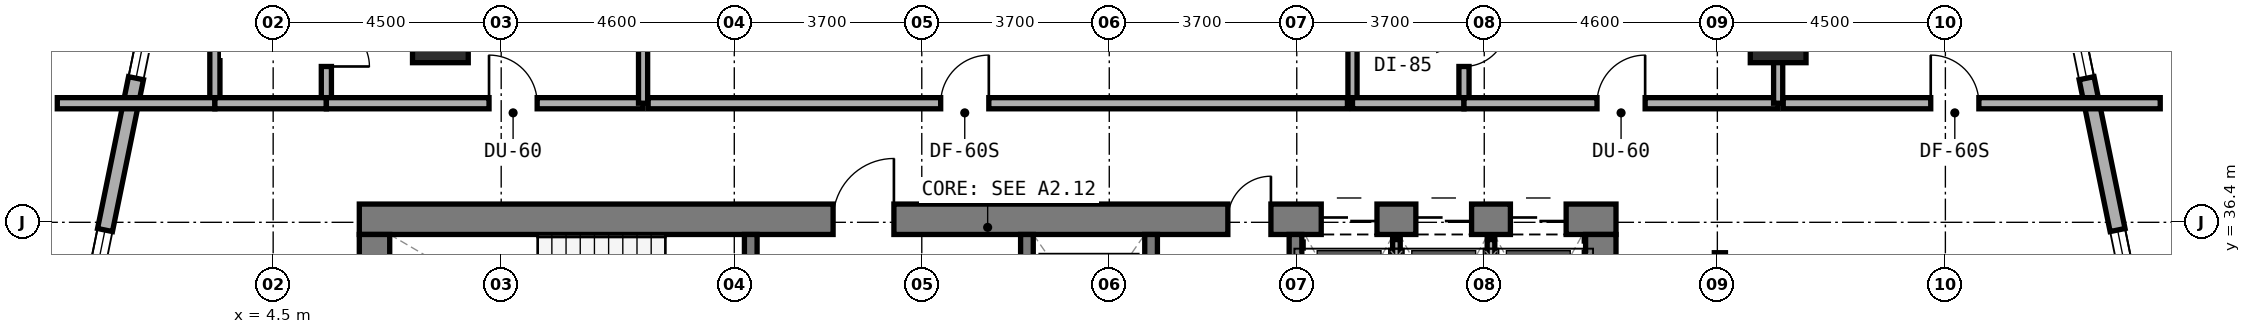
"""IFC4 building model, lengths in metres.
Left out: names, types, materials, properties, quantities, classifications, styles, units other than length and angle.
Written with IfcOpenShell. Run it as: python <this file> out.ifc"""

import sys

from ifc_helpers import new_model, si_unit, direction, frame, frame_2d, origin, origin_2d, place, context, subcontext, project, spatial, rectangle, extrude, element, fill, save


model = new_model("IFC4")
c1 = context("Model", 3, precision=1e-05, world=origin(), true_north=direction((0.0, 1.0)))
c2 = subcontext(c1, "Body", "Model", "MODEL_VIEW")
j1 = project(units=[si_unit("LENGTHUNIT", "METRE"), si_unit("PLANEANGLEUNIT", "RADIAN")], contexts=[c1])
p1 = place(None, origin())
s1 = spatial("IfcSite", under=j1, at=p1, CompositionType="ELEMENT")
p2 = place(p1, origin())
s2 = spatial("IfcBuilding", under=s1, at=p2, CompositionType="ELEMENT")
p3 = place(p2, frame((0.0, 0.0, 45.0)))
s3 = spatial("IfcBuildingStorey", under=s2, at=p3, CompositionType="ELEMENT", Elevation=45.0)
p4 = place(p3, frame((6.2, 36.46, 0.0), z_axis=(0.0, 0.0, 1.0), x_axis=(1.0, 0.0, 0.0)))
e1 = element("IfcWall", 1, at=p4, inside=s3, PredefinedType="SHEAR", context=c2, shape_type="SweptSolid", body=[
    extrude(rectangle(XDim=24.8, YDim=0.6, at=frame_2d((12.4, 0.0))), origin(), (0.0, 0.0, 1.0), 3.5),
])
p5 = place(p4, frame((9.35, 0.0, 0.0)))
e2 = element("IfcOpeningElement", 2, at=p5, cuts=e1, PredefinedType="OPENING", context=c2, shape_type="SweptSolid", body=[
    extrude(rectangle(XDim=1.2, YDim=2.15, at=frame_2d((0.6, 1.075))), frame((0.0, 0.31, 0.0), z_axis=(0.0, -1.0, 0.0), x_axis=(1.0, 0.0, 0.0)), (0.0, 0.0, 1.0), 0.62),
])
p6 = place(p4, frame((17.14, 0.0, 0.0)))
e3 = element("IfcOpeningElement", 3, at=p6, cuts=e1, PredefinedType="OPENING", context=c2, shape_type="SweptSolid", body=[
    extrude(rectangle(XDim=0.85, YDim=2.1, at=frame_2d((0.425, 1.05))), frame((0.0, 0.31, 0.0), z_axis=(0.0, -1.0, 0.0), x_axis=(1.0, 0.0, 0.0)), (0.0, 0.0, 1.0), 0.62),
])
p7 = place(p4, frame((18.983, 0.0, 0.0)))
e4 = element("IfcOpeningElement", 4, at=p7, cuts=e1, PredefinedType="OPENING", context=c2, shape_type="SweptSolid", body=[
    extrude(rectangle(XDim=1.1, YDim=2.15, at=frame_2d((0.55, 1.075))), frame((0.0, 0.31, 0.0), z_axis=(0.0, -1.0, 0.0), x_axis=(1.0, 0.0, 0.0)), (0.0, 0.0, 1.0), 0.62),
])
p8 = place(p4, frame((20.85, 0.0, 0.0)))
e5 = element("IfcOpeningElement", 5, at=p8, cuts=e1, PredefinedType="OPENING", context=c2, shape_type="SweptSolid", body=[
    extrude(rectangle(XDim=1.1, YDim=2.15, at=frame_2d((0.55, 1.075))), frame((0.0, 0.31, 0.0), z_axis=(0.0, -1.0, 0.0), x_axis=(1.0, 0.0, 0.0)), (0.0, 0.0, 1.0), 0.62),
])
p9 = place(p4, frame((22.716, 0.0, 0.0)))
e6 = element("IfcOpeningElement", 6, at=p9, cuts=e1, PredefinedType="OPENING", context=c2, shape_type="SweptSolid", body=[
    extrude(rectangle(XDim=1.1, YDim=2.15, at=frame_2d((0.55, 1.075))), frame((0.0, 0.31, 0.0), z_axis=(0.0, -1.0, 0.0), x_axis=(1.0, 0.0, 0.0)), (0.0, 0.0, 1.0), 0.62),
])
for number, where, z_axis, x_axis in (
    (7, (6.5, 33.0, 0.0), (0.0, 0.0, 1.0), (0.0, 1.0, 0.0)),
    (8, (30.7, 33.0, 0.0), (0.0, 0.0, 1.0), (0.0, 1.0, 0.0)),
):
    element("IfcWall", number, at=place(p3, frame(where, z_axis=z_axis, x_axis=x_axis)), inside=s3, PredefinedType="SHEAR", context=c2, shape_type="SweptSolid", body=[
        extrude(rectangle(XDim=3.16, YDim=0.6, at=frame_2d((1.58, 0.0))), origin(), (0.0, 0.0, 1.0), 3.5),
    ])
p10 = place(p3, frame((13.925, 33.0, 0.0), z_axis=(0.0, 0.0, 1.0), x_axis=(0.0, 1.0, 0.0)))
e9 = element("IfcWall", 9, at=p10, inside=s3, PredefinedType="STANDARD", context=c2, shape_type="SweptSolid", body=[
    extrude(rectangle(XDim=3.16, YDim=0.25, at=frame_2d((1.58, 0.0))), origin(), (0.0, 0.0, 1.0), 3.22),
])
p11 = place(p10, frame((0.98, 0.0, 0.0)))
e10 = element("IfcOpeningElement", 10, at=p11, cuts=e9, PredefinedType="OPENING", context=c2, shape_type="SweptSolid", body=[
    extrude(rectangle(XDim=1.1, YDim=2.15, at=frame_2d((0.55, 1.075))), frame((0.0, 0.135, 0.0), z_axis=(0.0, -1.0, 0.0), x_axis=(1.0, 0.0, 0.0)), (0.0, 0.0, 1.0), 0.27),
])
p12 = place(p3, frame((19.375, 33.0, 0.0), z_axis=(0.0, 0.0, 1.0), x_axis=(0.0, 1.0, 0.0)))
e11 = element("IfcWall", 11, at=p12, inside=s3, PredefinedType="STANDARD", context=c2, shape_type="SweptSolid", body=[
    extrude(rectangle(XDim=3.16, YDim=0.25, at=frame_2d((1.58, 0.0))), origin(), (0.0, 0.0, 1.0), 3.22),
])
p13 = place(p12, frame((0.98, 0.0, 0.0)))
e12 = element("IfcOpeningElement", 12, at=p13, cuts=e11, PredefinedType="OPENING", context=c2, shape_type="SweptSolid", body=[
    extrude(rectangle(XDim=1.1, YDim=2.15, at=frame_2d((0.55, 1.075))), frame((0.0, 0.135, 0.0), z_axis=(0.0, -1.0, 0.0), x_axis=(1.0, 0.0, 0.0)), (0.0, 0.0, 1.0), 0.27),
])
for number, where, z_axis, x_axis in (
    (13, (21.825, 33.0, 0.0), (0.0, 0.0, 1.0), (0.0, 1.0, 0.0)),
    (14, (24.675, 33.0, 0.0), (0.0, 0.0, 1.0), (0.0, 1.0, 0.0)),
):
    element("IfcWall", number, at=place(p3, frame(where, z_axis=z_axis, x_axis=x_axis)), inside=s3, PredefinedType="STANDARD", context=c2, shape_type="SweptSolid", body=[
        extrude(rectangle(XDim=3.16, YDim=0.25, at=frame_2d((1.58, 0.0))), origin(), (0.0, 0.0, 1.0), 3.22),
    ])
for number, where, z_axis, x_axis in (
    (15, (34.2, 40.2, 0.0), (0.0, 0.0, 1.0), (1.0, 0.0, 0.0)),
    (16, (7.8, 40.2, 0.0), (0.0, 0.0, 1.0), (1.0, 0.0, 0.0)),
):
    element("IfcColumn", number, at=place(p3, frame(where, z_axis=z_axis, x_axis=x_axis)), inside=s3, PredefinedType="COLUMN", context=c2, shape_type="SweptSolid", body=[
        extrude(rectangle(XDim=1.1, YDim=1.3, at=origin_2d()), origin(), (0.0, 0.0, 1.0), 3.5),
    ])
p14 = place(p3, frame((41.864, 31.516, 0.0), z_axis=(0.0, 0.0, 1.0), x_axis=(-0.199990901713, 0.979797754249, 0.0)))
e17 = element("IfcWall", 17, at=p14, inside=s3, PredefinedType="STANDARD", context=c2, shape_type="SweptSolid", body=[
    extrude(rectangle(XDim=10.065, YDim=0.3, at=frame_2d((5.033, 0.0))), origin(), (0.0, 0.0, 1.0), 3.22),
])
p15 = place(p14, frame((2.429, 0.0, 0.8)))
e18 = element("IfcOpeningElement", 18, at=p15, cuts=e17, PredefinedType="OPENING", context=c2, shape_type="SweptSolid", body=[
    extrude(rectangle(XDim=2.4, YDim=1.6, at=frame_2d((1.2, 0.8))), frame((0.0, 0.16, 0.0), z_axis=(0.0, -1.0, 0.0), x_axis=(1.0, 0.0, 0.0)), (0.0, 0.0, 1.0), 0.32),
])
p16 = place(p14, frame((7.887, 0.0, 0.85)))
e19 = element("IfcOpeningElement", 19, at=p16, cuts=e17, PredefinedType="OPENING", context=c2, shape_type="SweptSolid", body=[
    extrude(rectangle(XDim=1.8, YDim=1.5, at=frame_2d((0.9, 0.75))), frame((0.0, 0.16, 0.0), z_axis=(0.0, -1.0, 0.0), x_axis=(1.0, 0.0, 0.0)), (0.0, 0.0, 1.0), 0.32),
])
p17 = place(p3, frame((2.229, 41.378, 0.0), z_axis=(0.0, 0.0, 1.0), x_axis=(-0.199990901713, -0.979797754249, 0.0)))
e20 = element("IfcWall", 20, at=p17, inside=s3, PredefinedType="STANDARD", context=c2, shape_type="SweptSolid", body=[
    extrude(rectangle(XDim=10.065, YDim=0.3, at=frame_2d((5.033, 0.0))), origin(), (0.0, 0.0, 1.0), 3.22),
])
p18 = place(p17, frame((0.378, 0.0, 0.85)))
e21 = element("IfcOpeningElement", 21, at=p18, cuts=e20, PredefinedType="OPENING", context=c2, shape_type="SweptSolid", body=[
    extrude(rectangle(XDim=1.8, YDim=1.5, at=frame_2d((0.9, 0.75))), frame((0.0, 0.16, 0.0), z_axis=(0.0, -1.0, 0.0), x_axis=(1.0, 0.0, 0.0)), (0.0, 0.0, 1.0), 0.32),
])
p19 = place(p17, frame((5.236, 0.0, 0.8)))
e22 = element("IfcOpeningElement", 22, at=p19, cuts=e20, PredefinedType="OPENING", context=c2, shape_type="SweptSolid", body=[
    extrude(rectangle(XDim=2.4, YDim=1.6, at=frame_2d((1.2, 0.8))), frame((0.0, 0.16, 0.0), z_axis=(0.0, -1.0, 0.0), x_axis=(1.0, 0.0, 0.0)), (0.0, 0.0, 1.0), 0.32),
])
p20 = place(p3, frame((26.667, 33.1, 0.0), z_axis=(0.0, 0.0, 1.0), x_axis=(0.0, 1.0, 0.0)))
e23 = element("IfcWall", 23, at=p20, inside=s3, PredefinedType="PARTITIONING", context=c2, shape_type="SweptSolid", body=[
    extrude(rectangle(XDim=2.96, YDim=0.15, at=frame_2d((1.48, 0.0))), origin(), (0.0, 0.0, 1.0), 3.22),
])
p21 = place(p3, frame((28.533, 33.1, 0.0), z_axis=(0.0, 0.0, 1.0), x_axis=(0.0, 1.0, 0.0)))
e24 = element("IfcWall", 24, at=p21, inside=s3, PredefinedType="PARTITIONING", context=c2, shape_type="SweptSolid", body=[
    extrude(rectangle(XDim=2.96, YDim=0.15, at=frame_2d((1.48, 0.0))), origin(), (0.0, 0.0, 1.0), 2.395),
])
p22 = place(p3, frame((5.55, 38.85, 0.0), z_axis=(0.0, 0.0, 1.0), x_axis=(0.0, 1.0, 0.0)))
e25 = element("IfcWall", 25, at=p22, inside=s3, PredefinedType="PLUMBINGWALL", context=c2, shape_type="SweptSolid", body=[
    extrude(rectangle(XDim=2.1, YDim=0.2, at=frame_2d((1.05, 0.0))), origin(), (0.0, 0.0, 1.0), 3.22),
])
p23 = place(p22, frame((0.625, 0.0, 0.0)))
e26 = element("IfcOpeningElement", 26, at=p23, cuts=e25, PredefinedType="OPENING", context=c2, shape_type="SweptSolid", body=[
    extrude(rectangle(XDim=0.85, YDim=2.1, at=frame_2d((0.425, 1.05))), frame((0.0, 0.11, 0.0), z_axis=(0.0, -1.0, 0.0), x_axis=(1.0, 0.0, 0.0)), (0.0, 0.0, 1.0), 0.22),
])
p24 = place(p3, frame((3.35, 38.85, 0.0), z_axis=(0.0, 0.0, 1.0), x_axis=(0.0, 1.0, 0.0)))
e27 = element("IfcWall", 27, at=p24, inside=s3, PredefinedType="PLUMBINGWALL", context=c2, shape_type="SweptSolid", body=[
    extrude(rectangle(XDim=2.1, YDim=0.2, at=frame_2d((1.05, 0.0))), origin(), (0.0, 0.0, 1.0), 3.22),
])
p25 = place(p3, frame((0.24, 38.75, 0.0), z_axis=(0.0, 0.0, 1.0), x_axis=(1.0, 0.0, 0.0)))
e28 = element("IfcWall", 28, at=p25, inside=s3, PredefinedType="SOLIDWALL", context=c2, shape_type="SweptSolid", body=[
    extrude(rectangle(XDim=3.11, YDim=0.22, at=frame_2d((1.555, 0.0))), origin(), (0.0, 0.0, 1.0), 3.22),
])
p26 = place(p3, frame((3.35, 38.75, 0.0), z_axis=(0.0, 0.0, 1.0), x_axis=(1.0, 0.0, 0.0)))
e29 = element("IfcWall", 29, at=p26, inside=s3, PredefinedType="SOLIDWALL", context=c2, shape_type="SweptSolid", body=[
    extrude(rectangle(XDim=2.2, YDim=0.22, at=frame_2d((1.1, 0.0))), origin(), (0.0, 0.0, 1.0), 3.22),
])
p27 = place(p3, frame((5.55, 38.75, 0.0), z_axis=(0.0, 0.0, 1.0), x_axis=(1.0, 0.0, 0.0)))
e30 = element("IfcWall", 30, at=p27, inside=s3, PredefinedType="SOLIDWALL", context=c2, shape_type="SweptSolid", body=[
    extrude(rectangle(XDim=6.25, YDim=0.22, at=frame_2d((3.125, 0.0))), origin(), (0.0, 0.0, 1.0), 2.395),
])
p28 = place(p27, frame((3.21, 0.0, 0.0)))
e31 = element("IfcOpeningElement", 31, at=p28, cuts=e30, PredefinedType="OPENING", context=c2, shape_type="SweptSolid", body=[
    extrude(rectangle(XDim=0.95, YDim=2.1, at=frame_2d((0.475, 1.05))), frame((0.0, 0.12, 0.0), z_axis=(0.0, -1.0, 0.0), x_axis=(1.0, 0.0, 0.0)), (0.0, 0.0, 1.0), 0.24),
])
p29 = place(p3, frame((11.8, 38.75, 0.0), z_axis=(0.0, 0.0, 1.0), x_axis=(0.0, 1.0, 0.0)))
e32 = element("IfcWall", 32, at=p29, inside=s3, PredefinedType="SOLIDWALL", context=c2, shape_type="SweptSolid", body=[
    extrude(rectangle(XDim=7.538, YDim=0.18, at=frame_2d((3.769, 0.0))), origin(), (0.0, 0.0, 1.0), 2.745),
])
p30 = place(p3, frame((11.9, 38.75, 0.0), z_axis=(0.0, 0.0, 1.0), x_axis=(1.0, 0.0, 0.0)))
e33 = element("IfcWall", 33, at=p30, inside=s3, PredefinedType="SOLIDWALL", context=c2, shape_type="SweptSolid", body=[
    extrude(rectangle(XDim=13.8, YDim=0.22, at=frame_2d((6.9, 0.0))), origin(), (0.0, 0.0, 1.0), 2.395),
])
p31 = place(p30, frame((5.773, 0.0, 0.0)))
e34 = element("IfcOpeningElement", 34, at=p31, cuts=e33, PredefinedType="OPENING", context=c2, shape_type="SweptSolid", body=[
    extrude(rectangle(XDim=0.95, YDim=2.1, at=frame_2d((0.475, 1.05))), frame((0.0, 0.12, 0.0), z_axis=(0.0, -1.0, 0.0), x_axis=(1.0, 0.0, 0.0)), (0.0, 0.0, 1.0), 0.24),
])
p32 = place(p3, frame((25.8, 38.75, 0.0), z_axis=(0.0, 0.0, 1.0), x_axis=(0.0, 1.0, 0.0)))
e35 = element("IfcWall", 35, at=p32, inside=s3, PredefinedType="SOLIDWALL", context=c2, shape_type="SweptSolid", body=[
    extrude(rectangle(XDim=8.19, YDim=0.18, at=frame_2d((4.095, 0.0))), origin(), (0.0, 0.0, 1.0), 2.395),
])
p33 = place(p3, frame((28.0, 38.85, 0.0), z_axis=(0.0, 0.0, 1.0), x_axis=(0.0, 1.0, 0.0)))
e36 = element("IfcWall", 36, at=p33, inside=s3, PredefinedType="PLUMBINGWALL", context=c2, shape_type="SweptSolid", body=[
    extrude(rectangle(XDim=2.1, YDim=0.2, at=frame_2d((1.05, 0.0))), origin(), (0.0, 0.0, 1.0), 2.745),
])
p34 = place(p33, frame((0.625, 0.0, 0.0)))
e37 = element("IfcOpeningElement", 37, at=p34, cuts=e36, PredefinedType="OPENING", context=c2, shape_type="SweptSolid", body=[
    extrude(rectangle(XDim=0.85, YDim=2.1, at=frame_2d((0.425, 1.05))), frame((0.0, 0.11, 0.0), z_axis=(0.0, -1.0, 0.0), x_axis=(1.0, 0.0, 0.0)), (0.0, 0.0, 1.0), 0.22),
])
p35 = place(p3, frame((25.8, 38.75, 0.0), z_axis=(0.0, 0.0, 1.0), x_axis=(1.0, 0.0, 0.0)))
e38 = element("IfcWall", 38, at=p35, inside=s3, PredefinedType="SOLIDWALL", context=c2, shape_type="SweptSolid", body=[
    extrude(rectangle(XDim=2.2, YDim=0.22, at=frame_2d((1.1, 0.0))), origin(), (0.0, 0.0, 1.0), 2.395),
])
p36 = place(p3, frame((28.0, 38.75, 0.0), z_axis=(0.0, 0.0, 1.0), x_axis=(1.0, 0.0, 0.0)))
e39 = element("IfcWall", 39, at=p36, inside=s3, PredefinedType="SOLIDWALL", context=c2, shape_type="SweptSolid", body=[
    extrude(rectangle(XDim=6.2, YDim=0.22, at=frame_2d((3.1, 0.0))), origin(), (0.0, 0.0, 1.0), 2.395),
])
p37 = place(p36, frame((2.625, 0.0, 0.0)))
e40 = element("IfcOpeningElement", 40, at=p37, cuts=e39, PredefinedType="OPENING", context=c2, shape_type="SweptSolid", body=[
    extrude(rectangle(XDim=0.95, YDim=2.1, at=frame_2d((0.475, 1.05))), frame((0.0, 0.12, 0.0), z_axis=(0.0, -1.0, 0.0), x_axis=(1.0, 0.0, 0.0)), (0.0, 0.0, 1.0), 0.24),
])
p38 = place(p3, frame((34.2, 38.75, 0.0), z_axis=(0.0, 0.0, 1.0), x_axis=(0.0, 1.0, 0.0)))
e41 = element("IfcWall", 41, at=p38, inside=s3, PredefinedType="SOLIDWALL", context=c2, shape_type="SweptSolid", body=[
    extrude(rectangle(XDim=6.674, YDim=0.18, at=frame_2d((3.337, 0.0))), origin(), (0.0, 0.0, 1.0), 2.395),
])
p39 = place(p3, frame((34.3, 38.75, 0.0), z_axis=(0.0, 0.0, 1.0), x_axis=(1.0, 0.0, 0.0)))
e42 = element("IfcWall", 42, at=p39, inside=s3, PredefinedType="SOLIDWALL", context=c2, shape_type="SweptSolid", body=[
    extrude(rectangle(XDim=7.44, YDim=0.22, at=frame_2d((3.72, 0.0))), origin(), (0.0, 0.0, 1.0), 2.745),
])
p40 = place(p39, frame((2.911, 0.0, 0.0)))
e43 = element("IfcOpeningElement", 43, at=p40, cuts=e42, PredefinedType="OPENING", context=c2, shape_type="SweptSolid", body=[
    extrude(rectangle(XDim=0.95, YDim=2.1, at=frame_2d((0.475, 1.05))), frame((0.0, 0.12, 0.0), z_axis=(0.0, -1.0, 0.0), x_axis=(1.0, 0.0, 0.0)), (0.0, 0.0, 1.0), 0.24),
])
p41 = place(p3, frame((33.05, 26.43, 0.0), z_axis=(0.0, 0.0, 1.0), x_axis=(0.0, 1.0, 0.0)))
e44 = element("IfcWall", 44, at=p41, inside=s3, PredefinedType="SOLIDWALL", context=c2, shape_type="SweptSolid", body=[
    extrude(rectangle(XDim=9.37, YDim=0.22, at=frame_2d((4.685, 0.0))), origin(), (0.0, 0.0, 1.0), 2.395),
])
p42 = place(p41, frame((4.21, 0.0, 0.0)))
e45 = element("IfcOpeningElement", 45, at=p42, cuts=e44, PredefinedType="OPENING", context=c2, shape_type="SweptSolid", body=[
    extrude(rectangle(XDim=0.95, YDim=2.1, at=frame_2d((0.475, 1.05))), frame((0.0, 0.12, 0.0), z_axis=(0.0, -1.0, 0.0), x_axis=(1.0, 0.0, 0.0)), (0.0, 0.0, 1.0), 0.24),
])
p43 = place(p15, origin())
e46 = element("IfcWindow", 46, at=p43, inside=s3, PartitioningType="SINGLE_PANEL", PredefinedType="WINDOW", context=c2, shape_type="SweptSolid", body=[
    extrude(rectangle(XDim=2.4, YDim=1.6, at=frame_2d((1.2, 0.8))), frame((0.0, 0.03, 0.0), z_axis=(0.0, -1.0, 0.0), x_axis=(1.0, 0.0, 0.0)), (0.0, 0.0, 1.0), 0.06),
])
fill(e18, e46)
p44 = place(p16, origin())
e47 = element("IfcWindow", 47, at=p44, inside=s3, PartitioningType="SINGLE_PANEL", PredefinedType="WINDOW", context=c2, shape_type="SweptSolid", body=[
    extrude(rectangle(XDim=1.8, YDim=1.5, at=frame_2d((0.9, 0.75))), frame((0.0, 0.03, 0.0), z_axis=(0.0, -1.0, 0.0), x_axis=(1.0, 0.0, 0.0)), (0.0, 0.0, 1.0), 0.06),
])
fill(e19, e47)
p45 = place(p18, origin())
e48 = element("IfcWindow", 48, at=p45, inside=s3, PartitioningType="SINGLE_PANEL", PredefinedType="WINDOW", context=c2, shape_type="SweptSolid", body=[
    extrude(rectangle(XDim=1.8, YDim=1.5, at=frame_2d((0.9, 0.75))), frame((0.0, 0.03, 0.0), z_axis=(0.0, -1.0, 0.0), x_axis=(1.0, 0.0, 0.0)), (0.0, 0.0, 1.0), 0.06),
])
fill(e21, e48)
p46 = place(p19, origin())
e49 = element("IfcWindow", 49, at=p46, inside=s3, PartitioningType="SINGLE_PANEL", PredefinedType="WINDOW", context=c2, shape_type="SweptSolid", body=[
    extrude(rectangle(XDim=2.4, YDim=1.6, at=frame_2d((1.2, 0.8))), frame((0.0, 0.03, 0.0), z_axis=(0.0, -1.0, 0.0), x_axis=(1.0, 0.0, 0.0)), (0.0, 0.0, 1.0), 0.06),
])
fill(e22, e49)
p47 = place(p5, origin())
e50 = element("IfcDoor", 50, at=p47, inside=s3, OperationType="SINGLE_SWING_RIGHT", PredefinedType="DOOR", context=c2, shape_type="SweptSolid", body=[
    extrude(rectangle(XDim=1.2, YDim=2.15, at=frame_2d((0.6, 1.075))), frame((0.0, 0.025, 0.0), z_axis=(0.0, -1.0, 0.0), x_axis=(1.0, 0.0, 0.0)), (0.0, 0.0, 1.0), 0.05),
])
fill(e2, e50)
p48 = place(p6, origin())
e51 = element("IfcDoor", 51, at=p48, inside=s3, OperationType="SINGLE_SWING_RIGHT", PredefinedType="DOOR", context=c2, shape_type="SweptSolid", body=[
    extrude(rectangle(XDim=0.85, YDim=2.1, at=frame_2d((0.425, 1.05))), frame((0.0, 0.025, 0.0), z_axis=(0.0, -1.0, 0.0), x_axis=(1.0, 0.0, 0.0)), (0.0, 0.0, 1.0), 0.05),
])
fill(e3, e51)
p49 = place(p7, origin())
e52 = element("IfcDoor", 52, at=p49, inside=s3, OperationType="DOUBLE_DOOR_SLIDING", PredefinedType="DOOR", context=c2, shape_type="SweptSolid", body=[
    extrude(rectangle(XDim=1.1, YDim=2.15, at=frame_2d((0.55, 1.075))), frame((0.0, 0.025, 0.0), z_axis=(0.0, -1.0, 0.0), x_axis=(1.0, 0.0, 0.0)), (0.0, 0.0, 1.0), 0.05),
])
fill(e4, e52)
p50 = place(p8, origin())
e53 = element("IfcDoor", 53, at=p50, inside=s3, OperationType="DOUBLE_DOOR_SLIDING", PredefinedType="DOOR", context=c2, shape_type="SweptSolid", body=[
    extrude(rectangle(XDim=1.1, YDim=2.15, at=frame_2d((0.55, 1.075))), frame((0.0, 0.025, 0.0), z_axis=(0.0, -1.0, 0.0), x_axis=(1.0, 0.0, 0.0)), (0.0, 0.0, 1.0), 0.05),
])
fill(e5, e53)
p51 = place(p9, origin())
e54 = element("IfcDoor", 54, at=p51, inside=s3, OperationType="DOUBLE_DOOR_SLIDING", PredefinedType="DOOR", context=c2, shape_type="SweptSolid", body=[
    extrude(rectangle(XDim=1.1, YDim=2.15, at=frame_2d((0.55, 1.075))), frame((0.0, 0.025, 0.0), z_axis=(0.0, -1.0, 0.0), x_axis=(1.0, 0.0, 0.0)), (0.0, 0.0, 1.0), 0.05),
])
fill(e6, e54)
p52 = place(p23, frame((0.85, 0.0, 0.0), z_axis=(0.0, 0.0, 1.0), x_axis=(-1.0, 0.0, 0.0)))
e55 = element("IfcDoor", 55, at=p52, inside=s3, OperationType="SINGLE_SWING_RIGHT", PredefinedType="DOOR", context=c2, shape_type="SweptSolid", body=[
    extrude(rectangle(XDim=0.85, YDim=2.1, at=frame_2d((0.425, 1.05))), frame((0.0, 0.025, 0.0), z_axis=(0.0, -1.0, 0.0), x_axis=(1.0, 0.0, 0.0)), (0.0, 0.0, 1.0), 0.05),
])
fill(e26, e55)
p53 = place(p28, origin())
e56 = element("IfcDoor", 56, at=p53, inside=s3, OperationType="SINGLE_SWING_LEFT", PredefinedType="DOOR", context=c2, shape_type="SweptSolid", body=[
    extrude(rectangle(XDim=0.95, YDim=2.1, at=frame_2d((0.475, 1.05))), frame((0.0, 0.025, 0.0), z_axis=(0.0, -1.0, 0.0), x_axis=(1.0, 0.0, 0.0)), (0.0, 0.0, 1.0), 0.05),
])
fill(e31, e56)
p54 = place(p31, origin())
e57 = element("IfcDoor", 57, at=p54, inside=s3, OperationType="SINGLE_SWING_RIGHT", PredefinedType="DOOR", context=c2, shape_type="SweptSolid", body=[
    extrude(rectangle(XDim=0.95, YDim=2.1, at=frame_2d((0.475, 1.05))), frame((0.0, 0.025, 0.0), z_axis=(0.0, -1.0, 0.0), x_axis=(1.0, 0.0, 0.0)), (0.0, 0.0, 1.0), 0.05),
])
fill(e34, e57)
p55 = place(p34, frame((0.85, 0.0, 0.0), z_axis=(0.0, 0.0, 1.0), x_axis=(-1.0, 0.0, 0.0)))
e58 = element("IfcDoor", 58, at=p55, inside=s3, OperationType="SINGLE_SWING_LEFT", PredefinedType="DOOR", context=c2, shape_type="SweptSolid", body=[
    extrude(rectangle(XDim=0.85, YDim=2.1, at=frame_2d((0.425, 1.05))), frame((0.0, 0.025, 0.0), z_axis=(0.0, -1.0, 0.0), x_axis=(1.0, 0.0, 0.0)), (0.0, 0.0, 1.0), 0.05),
])
fill(e37, e58)
p56 = place(p37, origin())
e59 = element("IfcDoor", 59, at=p56, inside=s3, OperationType="SINGLE_SWING_RIGHT", PredefinedType="DOOR", context=c2, shape_type="SweptSolid", body=[
    extrude(rectangle(XDim=0.95, YDim=2.1, at=frame_2d((0.475, 1.05))), frame((0.0, 0.025, 0.0), z_axis=(0.0, -1.0, 0.0), x_axis=(1.0, 0.0, 0.0)), (0.0, 0.0, 1.0), 0.05),
])
fill(e40, e59)
p57 = place(p40, origin())
e60 = element("IfcDoor", 60, at=p57, inside=s3, OperationType="SINGLE_SWING_LEFT", PredefinedType="DOOR", context=c2, shape_type="SweptSolid", body=[
    extrude(rectangle(XDim=0.95, YDim=2.1, at=frame_2d((0.475, 1.05))), frame((0.0, 0.025, 0.0), z_axis=(0.0, -1.0, 0.0), x_axis=(1.0, 0.0, 0.0)), (0.0, 0.0, 1.0), 0.05),
])
fill(e43, e60)
save(model, sys.argv[1])
